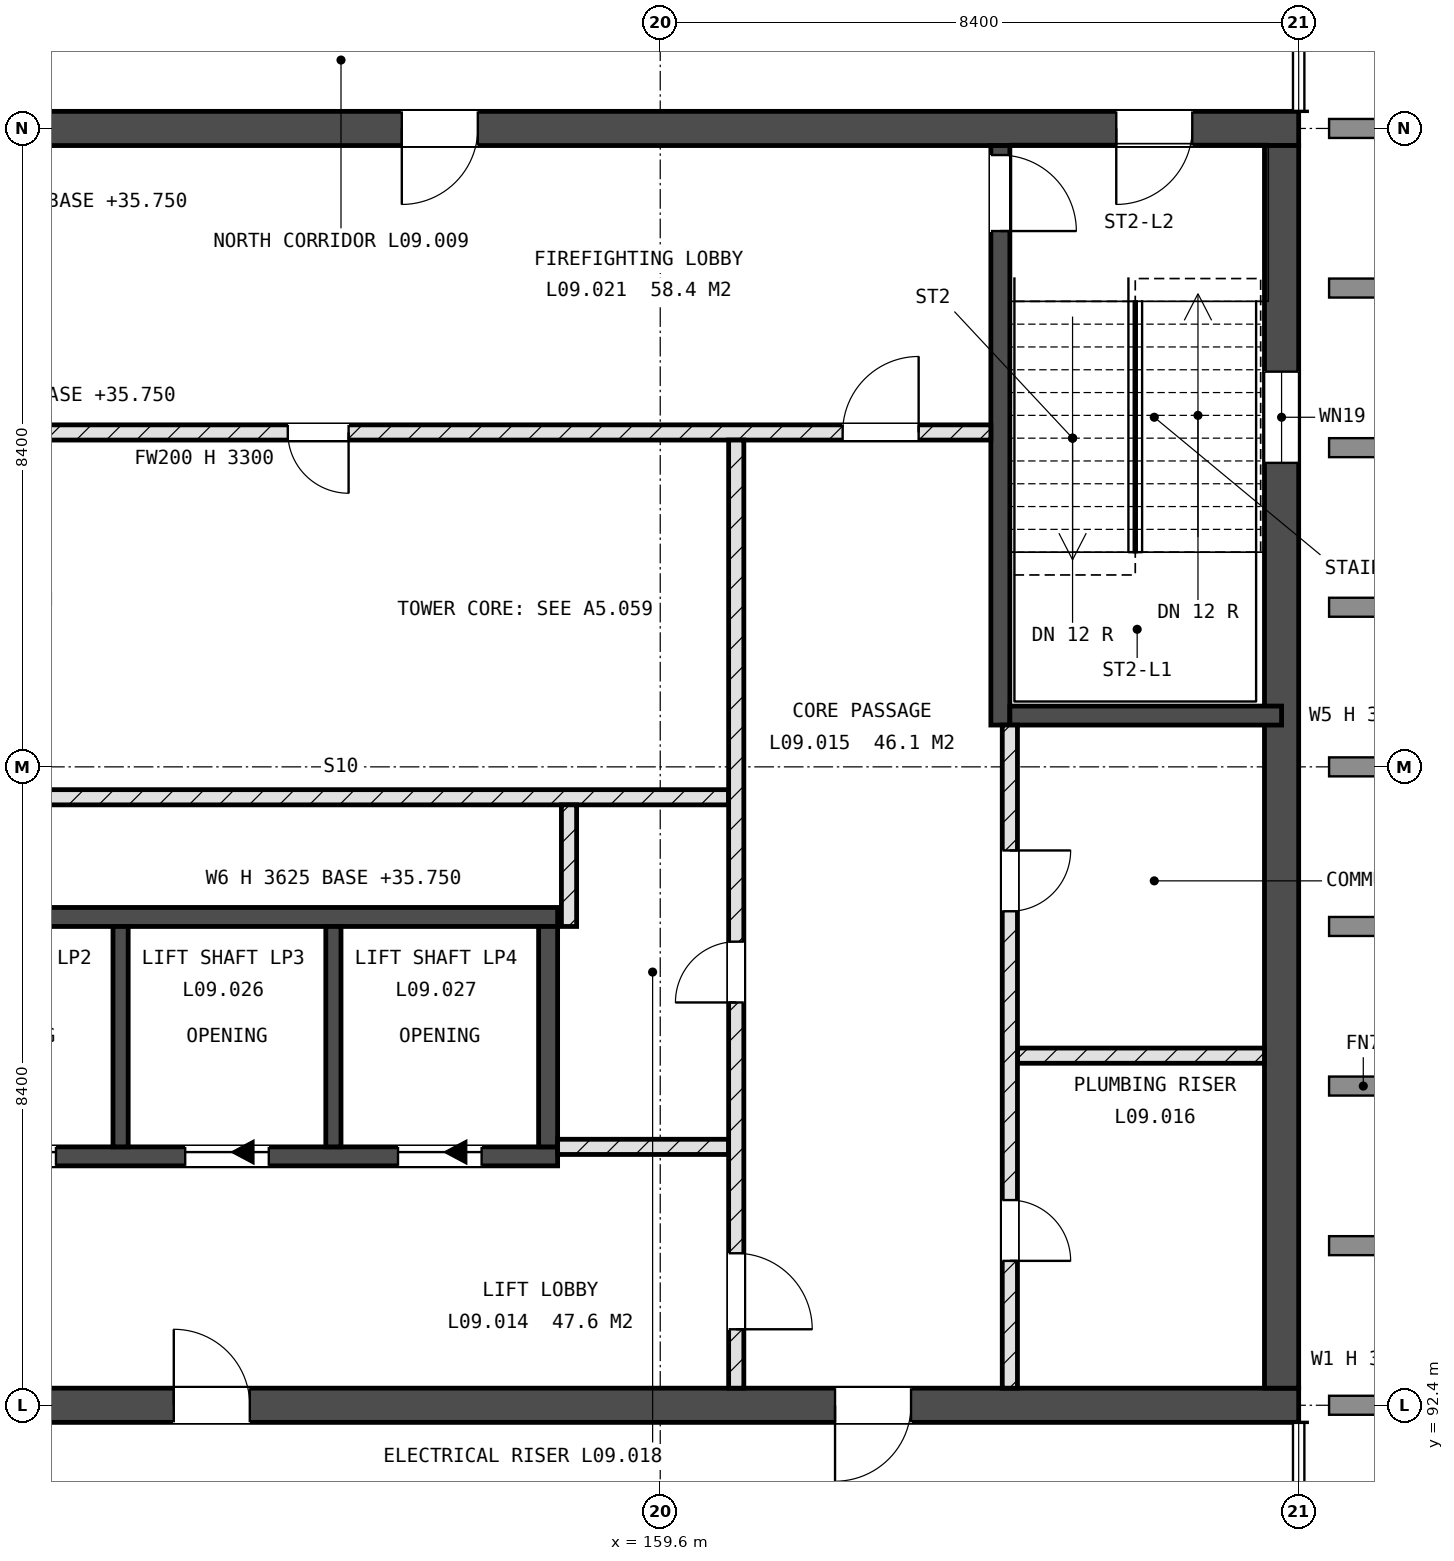
"""IFC4 building model, lengths in metres.
Left out: names, types, materials, properties, quantities, classifications, styles, units other than length and angle.
Written with IfcOpenShell. Run it as: python <this file> out.ifc"""

import sys

from ifc_helpers import new_model, si_unit, direction, frame, frame_2d, origin, place, context, subcontext, project, spatial, rectangle, extrude, element, fill, save


model = new_model("IFC4")
c1 = context("Model", 3, precision=1e-05, world=origin(), true_north=direction((0.0, 1.0)))
c2 = subcontext(c1, "Body", "Model", "MODEL_VIEW")
j1 = project(units=[si_unit("LENGTHUNIT", "METRE"), si_unit("PLANEANGLEUNIT", "RADIAN")], contexts=[c1])
p1 = place(None, origin())
s1 = spatial("IfcSite", under=j1, at=p1, CompositionType="ELEMENT")
p2 = place(p1, origin())
s2 = spatial("IfcBuilding", under=s1, at=p2, CompositionType="ELEMENT")
p3 = place(p2, frame((0.0, 0.0, 36.0)))
s3 = spatial("IfcBuildingStorey", under=s2, at=p3, CompositionType="ELEMENT", Elevation=36.0)
p4 = place(p3, frame((142.8, 92.4, -0.25), z_axis=(0.0, 0.0, 1.0), x_axis=(1.0, 0.0, 0.0)))
e1 = element("IfcWall", 1, at=p4, inside=s3, PredefinedType="SHEAR", context=c2, shape_type="SweptSolid", body=[
    extrude(rectangle(XDim=25.2, YDim=0.45, at=frame_2d((12.6, 0.0))), origin(), (0.0, 0.0, 1.0), 3.625),
])
p5 = place(p4, frame((1.4, 0.0, 0.25)))
e2 = element("IfcOpeningElement", 2, at=p5, cuts=e1, PredefinedType="OPENING", context=c2, shape_type="SweptSolid", body=[
    extrude(rectangle(XDim=1.0, YDim=2.1, at=frame_2d((0.5, 1.05))), frame((0.0, 0.235, 0.0), z_axis=(0.0, -1.0, 0.0), x_axis=(1.0, 0.0, 0.0)), (0.0, 0.0, 1.0), 0.47),
])
p6 = place(p4, frame((19.1, 0.0, 0.25)))
e3 = element("IfcOpeningElement", 3, at=p6, cuts=e1, PredefinedType="OPENING", context=c2, shape_type="SweptSolid", body=[
    extrude(rectangle(XDim=1.0, YDim=2.1, at=frame_2d((0.5, 1.05))), frame((0.0, 0.235, 0.0), z_axis=(0.0, -1.0, 0.0), x_axis=(1.0, 0.0, 0.0)), (0.0, 0.0, 1.0), 0.47),
])
p7 = place(p4, frame((10.4, 0.0, 0.25)))
e4 = element("IfcOpeningElement", 4, at=p7, cuts=e1, PredefinedType="OPENING", context=c2, shape_type="SweptSolid", body=[
    extrude(rectangle(XDim=1.0, YDim=2.1, at=frame_2d((0.5, 1.05))), frame((0.0, 0.235, 0.0), z_axis=(0.0, -1.0, 0.0), x_axis=(1.0, 0.0, 0.0)), (0.0, 0.0, 1.0), 0.47),
])
p8 = place(p3, frame((142.8, 109.2, -0.25), z_axis=(0.0, 0.0, 1.0), x_axis=(1.0, 0.0, 0.0)))
e5 = element("IfcWall", 5, at=p8, inside=s3, PredefinedType="SHEAR", context=c2, shape_type="SweptSolid", body=[
    extrude(rectangle(XDim=25.2, YDim=0.45, at=frame_2d((12.6, 0.0))), origin(), (0.0, 0.0, 1.0), 3.625),
])
p9 = place(p8, frame((22.8, 0.0, 0.25)))
e6 = element("IfcOpeningElement", 6, at=p9, cuts=e5, PredefinedType="OPENING", context=c2, shape_type="SweptSolid", body=[
    extrude(rectangle(XDim=1.0, YDim=2.1, at=frame_2d((0.5, 1.05))), frame((0.0, 0.235, 0.0), z_axis=(0.0, -1.0, 0.0), x_axis=(1.0, 0.0, 0.0)), (0.0, 0.0, 1.0), 0.47),
])
p10 = place(p8, frame((1.5, 0.0, 0.25)))
e7 = element("IfcOpeningElement", 7, at=p10, cuts=e5, PredefinedType="OPENING", context=c2, shape_type="SweptSolid", body=[
    extrude(rectangle(XDim=0.8, YDim=2.1, at=frame_2d((0.4, 1.05))), frame((0.0, 0.235, 0.0), z_axis=(0.0, -1.0, 0.0), x_axis=(1.0, 0.0, 0.0)), (0.0, 0.0, 1.0), 0.47),
])
p11 = place(p8, frame((13.4, 0.0, 0.25)))
e8 = element("IfcOpeningElement", 8, at=p11, cuts=e5, PredefinedType="OPENING", context=c2, shape_type="SweptSolid", body=[
    extrude(rectangle(XDim=1.0, YDim=2.1, at=frame_2d((0.5, 1.05))), frame((0.0, 0.235, 0.0), z_axis=(0.0, -1.0, 0.0), x_axis=(1.0, 0.0, 0.0)), (0.0, 0.0, 1.0), 0.47),
])
p12 = place(p3, frame((167.775, 92.625, -0.25), z_axis=(0.0, 0.0, 1.0), x_axis=(0.0, 1.0, 0.0)))
e9 = element("IfcWall", 9, at=p12, inside=s3, PredefinedType="SHEAR", context=c2, shape_type="SweptSolid", body=[
    extrude(rectangle(XDim=16.35, YDim=0.45, at=frame_2d((8.175, 0.0))), origin(), (0.0, 0.0, 1.0), 3.625),
])
p13 = place(p12, frame((12.175, 0.0, 1.85)))
e10 = element("IfcOpeningElement", 10, at=p13, cuts=e9, PredefinedType="OPENING", context=c2, shape_type="SweptSolid", body=[
    extrude(rectangle(XDim=1.2, YDim=0.9, at=frame_2d((0.6, 0.45))), frame((0.0, 0.235, 0.0), z_axis=(0.0, -1.0, 0.0), x_axis=(1.0, 0.0, 0.0)), (0.0, 0.0, 1.0), 0.47),
])
p14 = place(p3, frame((164.075, 101.35, -0.25), z_axis=(0.0, 0.0, 1.0), x_axis=(0.0, 1.0, 0.0)))
e11 = element("IfcWall", 11, at=p14, inside=s3, PredefinedType="SHEAR", context=c2, shape_type="SweptSolid", body=[
    extrude(rectangle(XDim=7.625, YDim=0.25, at=frame_2d((3.812, 0.0))), origin(), (0.0, 0.0, 1.0), 3.625),
])
p15 = place(p14, frame((6.5, 0.0, 0.25)))
e12 = element("IfcOpeningElement", 12, at=p15, cuts=e11, PredefinedType="OPENING", context=c2, shape_type="SweptSolid", body=[
    extrude(rectangle(XDim=1.0, YDim=2.1, at=frame_2d((0.5, 1.05))), frame((0.0, 0.135, 0.0), z_axis=(0.0, -1.0, 0.0), x_axis=(1.0, 0.0, 0.0)), (0.0, 0.0, 1.0), 0.27),
])
p16 = place(p3, frame((164.2, 101.475, -0.25), z_axis=(0.0, 0.0, 1.0), x_axis=(1.0, 0.0, 0.0)))
e13 = element("IfcWall", 13, at=p16, inside=s3, PredefinedType="SHEAR", context=c2, shape_type="SweptSolid", body=[
    extrude(rectangle(XDim=3.575, YDim=0.25, at=frame_2d((1.788, 0.0))), origin(), (0.0, 0.0, 1.0), 3.625),
])
p17 = place(p3, frame((147.0, 95.675, -0.25), z_axis=(0.0, 0.0, 1.0), x_axis=(1.0, 0.0, 0.0)))
e14 = element("IfcWall", 14, at=p17, inside=s3, PredefinedType="SHEAR", context=c2, shape_type="SweptSolid", body=[
    extrude(rectangle(XDim=11.25, YDim=0.25, at=frame_2d((5.625, 0.0))), origin(), (0.0, 0.0, 1.0), 3.625),
])
p18 = place(p17, frame((0.75, 0.0, 0.25)))
e15 = element("IfcOpeningElement", 15, at=p18, cuts=e14, PredefinedType="OPENING", context=c2, shape_type="SweptSolid", body=[
    extrude(rectangle(XDim=1.1, YDim=2.1, at=frame_2d((0.55, 1.05))), frame((0.0, 0.135, 0.0), z_axis=(0.0, -1.0, 0.0), x_axis=(1.0, 0.0, 0.0)), (0.0, 0.0, 1.0), 0.27),
])
p19 = place(p17, frame((3.55, 0.0, 0.25)))
e16 = element("IfcOpeningElement", 16, at=p19, cuts=e14, PredefinedType="OPENING", context=c2, shape_type="SweptSolid", body=[
    extrude(rectangle(XDim=1.1, YDim=2.1, at=frame_2d((0.55, 1.05))), frame((0.0, 0.135, 0.0), z_axis=(0.0, -1.0, 0.0), x_axis=(1.0, 0.0, 0.0)), (0.0, 0.0, 1.0), 0.27),
])
p20 = place(p17, frame((6.35, 0.0, 0.25)))
e17 = element("IfcOpeningElement", 17, at=p20, cuts=e14, PredefinedType="OPENING", context=c2, shape_type="SweptSolid", body=[
    extrude(rectangle(XDim=1.1, YDim=2.1, at=frame_2d((0.55, 1.05))), frame((0.0, 0.135, 0.0), z_axis=(0.0, -1.0, 0.0), x_axis=(1.0, 0.0, 0.0)), (0.0, 0.0, 1.0), 0.27),
])
p21 = place(p17, frame((9.15, 0.0, 0.25)))
e18 = element("IfcOpeningElement", 18, at=p21, cuts=e14, PredefinedType="OPENING", context=c2, shape_type="SweptSolid", body=[
    extrude(rectangle(XDim=1.1, YDim=2.1, at=frame_2d((0.55, 1.05))), frame((0.0, 0.135, 0.0), z_axis=(0.0, -1.0, 0.0), x_axis=(1.0, 0.0, 0.0)), (0.0, 0.0, 1.0), 0.27),
])
p22 = place(p3, frame((147.0, 98.825, -0.25), z_axis=(0.0, 0.0, 1.0), x_axis=(1.0, 0.0, 0.0)))
e19 = element("IfcWall", 19, at=p22, inside=s3, PredefinedType="SHEAR", context=c2, shape_type="SweptSolid", body=[
    extrude(rectangle(XDim=11.25, YDim=0.25, at=frame_2d((5.625, 0.0))), origin(), (0.0, 0.0, 1.0), 3.625),
])
p23 = place(p3, frame((158.125, 95.8, -0.25), z_axis=(0.0, 0.0, 1.0), x_axis=(0.0, 1.0, 0.0)))
e20 = element("IfcWall", 20, at=p23, inside=s3, PredefinedType="SHEAR", context=c2, shape_type="SweptSolid", body=[
    extrude(rectangle(XDim=2.9, YDim=0.25, at=frame_2d((1.45, 0.0))), origin(), (0.0, 0.0, 1.0), 3.625),
])
for number, where, z_axis, x_axis in (
    (21, (152.5, 95.8, -0.25), (0.0, 0.0, 1.0), (0.0, 1.0, 0.0)),
    (22, (155.3, 95.8, -0.25), (0.0, 0.0, 1.0), (0.0, 1.0, 0.0)),
):
    element("IfcWall", number, at=place(p3, frame(where, z_axis=z_axis, x_axis=x_axis)), inside=s3, PredefinedType="SHEAR", context=c2, shape_type="SweptSolid", body=[
        extrude(rectangle(XDim=2.9, YDim=0.2, at=frame_2d((1.45, 0.0))), origin(), (0.0, 0.0, 1.0), 3.625),
    ])
p24 = place(p3, frame((158.25, 95.8, 0.0), z_axis=(0.0, 0.0, 1.0), x_axis=(1.0, 0.0, 0.0)))
e23 = element("IfcWall", 23, at=p24, inside=s3, PredefinedType="SOLIDWALL", context=c2, shape_type="SweptSolid", body=[
    extrude(rectangle(XDim=2.25, YDim=0.2, at=frame_2d((1.125, 0.0))), origin(), (0.0, 0.0, 1.0), 3.3),
])
p25 = place(p3, frame((164.3, 97.0, 0.0), z_axis=(0.0, 0.0, 1.0), x_axis=(1.0, 0.0, 0.0)))
e24 = element("IfcWall", 24, at=p25, inside=s3, PredefinedType="SOLIDWALL", context=c2, shape_type="SweptSolid", body=[
    extrude(rectangle(XDim=3.25, YDim=0.2, at=frame_2d((1.625, 0.0))), origin(), (0.0, 0.0, 1.0), 3.3),
])
p26 = place(p3, frame((146.5, 100.4, 0.0), z_axis=(0.0, 0.0, 1.0), x_axis=(1.0, 0.0, 0.0)))
e25 = element("IfcWall", 25, at=p26, inside=s3, PredefinedType="SOLIDWALL", context=c2, shape_type="SweptSolid", body=[
    extrude(rectangle(XDim=14.0, YDim=0.2, at=frame_2d((7.0, 0.0))), origin(), (0.0, 0.0, 1.0), 3.3),
])
p27 = place(p3, frame((143.25, 105.2, 0.0), z_axis=(0.0, 0.0, 1.0), x_axis=(1.0, 0.0, 0.0)))
e26 = element("IfcWall", 26, at=p27, inside=s3, PredefinedType="SOLIDWALL", context=c2, shape_type="SweptSolid", body=[
    extrude(rectangle(XDim=20.7, YDim=0.2, at=frame_2d((10.35, 0.0))), origin(), (0.0, 0.0, 1.0), 3.3),
])
p28 = place(p27, frame((11.45, 0.0, 0.0)))
e27 = element("IfcOpeningElement", 27, at=p28, cuts=e26, PredefinedType="OPENING", context=c2, shape_type="SweptSolid", body=[
    extrude(rectangle(XDim=0.8, YDim=2.1, at=frame_2d((0.4, 1.05))), frame((0.0, 0.11, 0.0), z_axis=(0.0, -1.0, 0.0), x_axis=(1.0, 0.0, 0.0)), (0.0, 0.0, 1.0), 0.22),
])
p29 = place(p27, frame((18.75, 0.0, 0.0)))
e28 = element("IfcOpeningElement", 28, at=p29, cuts=e26, PredefinedType="OPENING", context=c2, shape_type="SweptSolid", body=[
    extrude(rectangle(XDim=1.0, YDim=2.1, at=frame_2d((0.5, 1.05))), frame((0.0, 0.11, 0.0), z_axis=(0.0, -1.0, 0.0), x_axis=(1.0, 0.0, 0.0)), (0.0, 0.0, 1.0), 0.22),
])
p30 = place(p3, frame((158.4, 98.7, 0.0), z_axis=(0.0, 0.0, 1.0), x_axis=(0.0, 1.0, 0.0)))
e29 = element("IfcWall", 29, at=p30, inside=s3, PredefinedType="SOLIDWALL", context=c2, shape_type="SweptSolid", body=[
    extrude(rectangle(XDim=1.6, YDim=0.2, at=frame_2d((0.8, 0.0))), origin(), (0.0, 0.0, 1.0), 3.3),
])
p31 = place(p3, frame((160.6, 92.625, 0.0), z_axis=(0.0, 0.0, 1.0), x_axis=(0.0, 1.0, 0.0)))
e30 = element("IfcWall", 30, at=p31, inside=s3, PredefinedType="SOLIDWALL", context=c2, shape_type="SweptSolid", body=[
    extrude(rectangle(XDim=12.475, YDim=0.2, at=frame_2d((6.238, 0.0))), origin(), (0.0, 0.0, 1.0), 3.3),
])
p32 = place(p31, frame((5.075, 0.0, 0.0)))
e31 = element("IfcOpeningElement", 31, at=p32, cuts=e30, PredefinedType="OPENING", context=c2, shape_type="SweptSolid", body=[
    extrude(rectangle(XDim=0.8, YDim=2.1, at=frame_2d((0.4, 1.05))), frame((0.0, 0.11, 0.0), z_axis=(0.0, -1.0, 0.0), x_axis=(1.0, 0.0, 0.0)), (0.0, 0.0, 1.0), 0.22),
])
p33 = place(p31, frame((0.775, 0.0, 0.0)))
e32 = element("IfcOpeningElement", 32, at=p33, cuts=e30, PredefinedType="OPENING", context=c2, shape_type="SweptSolid", body=[
    extrude(rectangle(XDim=1.0, YDim=2.1, at=frame_2d((0.5, 1.05))), frame((0.0, 0.11, 0.0), z_axis=(0.0, -1.0, 0.0), x_axis=(1.0, 0.0, 0.0)), (0.0, 0.0, 1.0), 0.22),
])
p34 = place(p3, frame((164.2, 92.625, 0.0), z_axis=(0.0, 0.0, 1.0), x_axis=(0.0, 1.0, 0.0)))
e33 = element("IfcWall", 33, at=p34, inside=s3, PredefinedType="SOLIDWALL", context=c2, shape_type="SweptSolid", body=[
    extrude(rectangle(XDim=8.725, YDim=0.2, at=frame_2d((4.363, 0.0))), origin(), (0.0, 0.0, 1.0), 3.3),
])
p35 = place(p34, frame((1.675, 0.0, 0.0)))
e34 = element("IfcOpeningElement", 34, at=p35, cuts=e33, PredefinedType="OPENING", context=c2, shape_type="SweptSolid", body=[
    extrude(rectangle(XDim=0.8, YDim=2.1, at=frame_2d((0.4, 1.05))), frame((0.0, 0.11, 0.0), z_axis=(0.0, -1.0, 0.0), x_axis=(1.0, 0.0, 0.0)), (0.0, 0.0, 1.0), 0.22),
])
p36 = place(p34, frame((6.275, 0.0, 0.0)))
e35 = element("IfcOpeningElement", 35, at=p36, cuts=e33, PredefinedType="OPENING", context=c2, shape_type="SweptSolid", body=[
    extrude(rectangle(XDim=0.8, YDim=2.1, at=frame_2d((0.4, 1.05))), frame((0.0, 0.11, 0.0), z_axis=(0.0, -1.0, 0.0), x_axis=(1.0, 0.0, 0.0)), (0.0, 0.0, 1.0), 0.22),
])
p37 = place(p13, origin())
e36 = element("IfcWindow", 36, at=p37, inside=s3, PartitioningType="SINGLE_PANEL", PredefinedType="WINDOW", context=c2, shape_type="SweptSolid", body=[
    extrude(rectangle(XDim=1.2, YDim=0.9, at=frame_2d((0.6, 0.45))), frame((0.0, 0.03, 0.0), z_axis=(0.0, -1.0, 0.0), x_axis=(1.0, 0.0, 0.0)), (0.0, 0.0, 1.0), 0.06),
])
fill(e10, e36)
p38 = place(p19, origin())
e37 = element("IfcDoor", 37, at=p38, inside=s3, OperationType="SLIDING_TO_LEFT", PredefinedType="DOOR", context=c2, shape_type="SweptSolid", body=[
    extrude(rectangle(XDim=1.1, YDim=2.1, at=frame_2d((0.55, 1.05))), frame((0.0, 0.025, 0.0), z_axis=(0.0, -1.0, 0.0), x_axis=(1.0, 0.0, 0.0)), (0.0, 0.0, 1.0), 0.05),
])
fill(e16, e37)
p39 = place(p20, origin())
e38 = element("IfcDoor", 38, at=p39, inside=s3, OperationType="SLIDING_TO_LEFT", PredefinedType="DOOR", context=c2, shape_type="SweptSolid", body=[
    extrude(rectangle(XDim=1.1, YDim=2.1, at=frame_2d((0.55, 1.05))), frame((0.0, 0.025, 0.0), z_axis=(0.0, -1.0, 0.0), x_axis=(1.0, 0.0, 0.0)), (0.0, 0.0, 1.0), 0.05),
])
fill(e17, e38)
p40 = place(p21, origin())
e39 = element("IfcDoor", 39, at=p40, inside=s3, OperationType="SLIDING_TO_LEFT", PredefinedType="DOOR", context=c2, shape_type="SweptSolid", body=[
    extrude(rectangle(XDim=1.1, YDim=2.1, at=frame_2d((0.55, 1.05))), frame((0.0, 0.025, 0.0), z_axis=(0.0, -1.0, 0.0), x_axis=(1.0, 0.0, 0.0)), (0.0, 0.0, 1.0), 0.05),
])
fill(e18, e39)
p41 = place(p15, origin())
e40 = element("IfcDoor", 40, at=p41, inside=s3, OperationType="SINGLE_SWING_LEFT", PredefinedType="DOOR", context=c2, shape_type="SweptSolid", body=[
    extrude(rectangle(XDim=1.0, YDim=2.1, at=frame_2d((0.5, 1.05))), frame((0.0, 0.025, 0.0), z_axis=(0.0, -1.0, 0.0), x_axis=(1.0, 0.0, 0.0)), (0.0, 0.0, 1.0), 0.05),
])
fill(e12, e40)
p42 = place(p9, origin())
e41 = element("IfcDoor", 41, at=p42, inside=s3, OperationType="SINGLE_SWING_LEFT", PredefinedType="DOOR", context=c2, shape_type="SweptSolid", body=[
    extrude(rectangle(XDim=1.0, YDim=2.1, at=frame_2d((0.5, 1.05))), frame((0.0, 0.025, 0.0), z_axis=(0.0, -1.0, 0.0), x_axis=(1.0, 0.0, 0.0)), (0.0, 0.0, 1.0), 0.05),
])
fill(e6, e41)
p43 = place(p35, origin())
e42 = element("IfcDoor", 42, at=p43, inside=s3, OperationType="SINGLE_SWING_LEFT", PredefinedType="DOOR", context=c2, shape_type="SweptSolid", body=[
    extrude(rectangle(XDim=0.8, YDim=2.1, at=frame_2d((0.4, 1.05))), frame((0.0, 0.025, 0.0), z_axis=(0.0, -1.0, 0.0), x_axis=(1.0, 0.0, 0.0)), (0.0, 0.0, 1.0), 0.05),
])
fill(e34, e42)
p44 = place(p36, origin())
e43 = element("IfcDoor", 43, at=p44, inside=s3, OperationType="SINGLE_SWING_RIGHT", PredefinedType="DOOR", context=c2, shape_type="SweptSolid", body=[
    extrude(rectangle(XDim=0.8, YDim=2.1, at=frame_2d((0.4, 1.05))), frame((0.0, 0.025, 0.0), z_axis=(0.0, -1.0, 0.0), x_axis=(1.0, 0.0, 0.0)), (0.0, 0.0, 1.0), 0.05),
])
fill(e35, e43)
p45 = place(p32, origin())
e44 = element("IfcDoor", 44, at=p45, inside=s3, OperationType="SINGLE_SWING_RIGHT", PredefinedType="DOOR", context=c2, shape_type="SweptSolid", body=[
    extrude(rectangle(XDim=0.8, YDim=2.1, at=frame_2d((0.4, 1.05))), frame((0.0, 0.025, 0.0), z_axis=(0.0, -1.0, 0.0), x_axis=(1.0, 0.0, 0.0)), (0.0, 0.0, 1.0), 0.05),
])
fill(e31, e44)
p46 = place(p28, origin())
e45 = element("IfcDoor", 45, at=p46, inside=s3, OperationType="SINGLE_SWING_RIGHT", PredefinedType="DOOR", context=c2, shape_type="SweptSolid", body=[
    extrude(rectangle(XDim=0.8, YDim=2.1, at=frame_2d((0.4, 1.05))), frame((0.0, 0.025, 0.0), z_axis=(0.0, -1.0, 0.0), x_axis=(1.0, 0.0, 0.0)), (0.0, 0.0, 1.0), 0.05),
])
fill(e27, e45)
p47 = place(p6, origin())
e46 = element("IfcDoor", 46, at=p47, inside=s3, OperationType="SINGLE_SWING_LEFT", PredefinedType="DOOR", context=c2, shape_type="SweptSolid", body=[
    extrude(rectangle(XDim=1.0, YDim=2.1, at=frame_2d((0.5, 1.05))), frame((0.0, 0.025, 0.0), z_axis=(0.0, -1.0, 0.0), x_axis=(1.0, 0.0, 0.0)), (0.0, 0.0, 1.0), 0.05),
])
fill(e3, e46)
p48 = place(p7, origin())
e47 = element("IfcDoor", 47, at=p48, inside=s3, OperationType="SINGLE_SWING_RIGHT", PredefinedType="DOOR", context=c2, shape_type="SweptSolid", body=[
    extrude(rectangle(XDim=1.0, YDim=2.1, at=frame_2d((0.5, 1.05))), frame((0.0, 0.025, 0.0), z_axis=(0.0, -1.0, 0.0), x_axis=(1.0, 0.0, 0.0)), (0.0, 0.0, 1.0), 0.05),
])
fill(e4, e47)
p49 = place(p11, origin())
e48 = element("IfcDoor", 48, at=p49, inside=s3, OperationType="SINGLE_SWING_LEFT", PredefinedType="DOOR", context=c2, shape_type="SweptSolid", body=[
    extrude(rectangle(XDim=1.0, YDim=2.1, at=frame_2d((0.5, 1.05))), frame((0.0, 0.025, 0.0), z_axis=(0.0, -1.0, 0.0), x_axis=(1.0, 0.0, 0.0)), (0.0, 0.0, 1.0), 0.05),
])
fill(e8, e48)
p50 = place(p33, origin())
e49 = element("IfcDoor", 49, at=p50, inside=s3, OperationType="SINGLE_SWING_LEFT", PredefinedType="DOOR", context=c2, shape_type="SweptSolid", body=[
    extrude(rectangle(XDim=1.0, YDim=2.1, at=frame_2d((0.5, 1.05))), frame((0.0, 0.025, 0.0), z_axis=(0.0, -1.0, 0.0), x_axis=(1.0, 0.0, 0.0)), (0.0, 0.0, 1.0), 0.05),
])
fill(e32, e49)
p51 = place(p29, origin())
e50 = element("IfcDoor", 50, at=p51, inside=s3, OperationType="SINGLE_SWING_LEFT", PredefinedType="DOOR", context=c2, shape_type="SweptSolid", body=[
    extrude(rectangle(XDim=1.0, YDim=2.1, at=frame_2d((0.5, 1.05))), frame((0.0, 0.025, 0.0), z_axis=(0.0, -1.0, 0.0), x_axis=(1.0, 0.0, 0.0)), (0.0, 0.0, 1.0), 0.05),
])
fill(e28, e50)
save(model, sys.argv[1])
